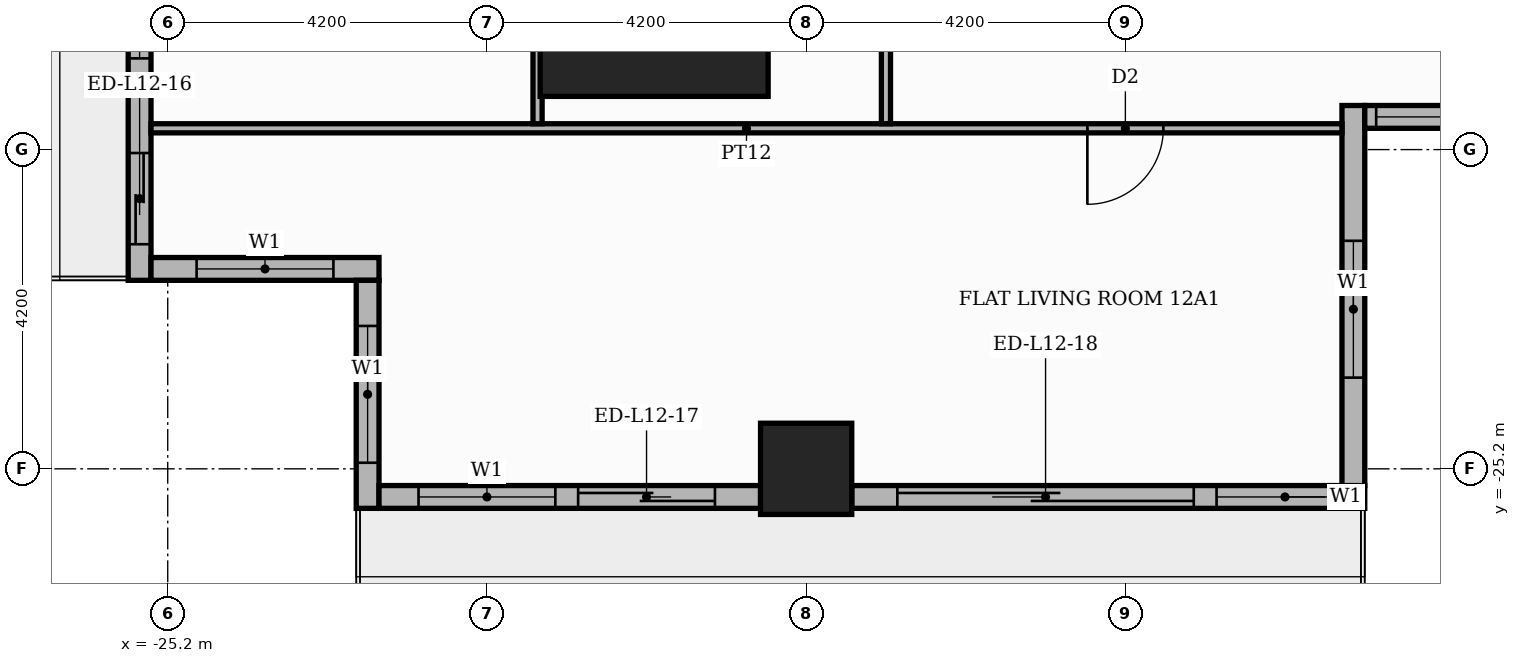
"""IFC4 building model, lengths in metres.
Left out: names, types, materials, properties, quantities, classifications, styles, units other than length and angle.
Written with IfcOpenShell. Run it as: python <this file> out.ifc"""

import sys

from ifc_helpers import new_model, si_unit, direction, frame, frame_2d, origin, origin_2d, place, context, subcontext, project, spatial, rectangle, extrude, element, fill, save


model = new_model("IFC4")
c1 = context("Model", 3, precision=1e-05, world=origin(), true_north=direction((0.0, 1.0)))
c2 = subcontext(c1, "Body", "Model", "MODEL_VIEW")
j1 = project(units=[si_unit("LENGTHUNIT", "METRE"), si_unit("PLANEANGLEUNIT", "RADIAN")], contexts=[c1])
p1 = place(None, origin())
s1 = spatial("IfcSite", under=j1, at=p1, CompositionType="ELEMENT")
p2 = place(p1, origin())
s2 = spatial("IfcBuilding", under=s1, at=p2, CompositionType="ELEMENT")
p3 = place(p2, frame((0.0, 0.0, 54.3)))
s3 = spatial("IfcBuildingStorey", under=s2, at=p3, CompositionType="ELEMENT", Elevation=54.3)
p4 = place(p3, frame((-18.8, -18.8, 0.0), z_axis=(0.0, 0.0, 1.0), x_axis=(1.0, 0.0, 0.0)))
e1 = element("IfcColumn", 1, at=p4, inside=s3, PredefinedType="COLUMN", context=c2, shape_type="SweptSolid", body=[
    extrude(rectangle(XDim=3.0, YDim=3.0, at=origin_2d()), origin(), (0.0, 0.0, 1.0), 3.9),
])
p5 = place(p3, frame((-16.8, -25.2, 0.0), z_axis=(0.0, 0.0, 1.0), x_axis=(1.0, 0.0, 0.0)))
e2 = element("IfcColumn", 2, at=p5, inside=s3, PredefinedType="COLUMN", context=c2, shape_type="SweptSolid", body=[
    extrude(rectangle(XDim=1.2, YDim=1.2, at=origin_2d()), origin(), (0.0, 0.0, 1.0), 3.9),
])
p6 = place(p3, frame((-25.57, -17.4, 0.0), z_axis=(0.0, 0.0, 1.0), x_axis=(0.0, -1.0, 0.0)))
e3 = element("IfcWall", 3, at=p6, inside=s3, PredefinedType="STANDARD", context=c2, shape_type="SweptSolid", body=[
    extrude(rectangle(XDim=5.32, YDim=0.3, at=frame_2d((2.66, 0.0))), origin(), (0.0, 0.0, 1.0), 3.48),
])
p7 = place(p6, frame((0.6, 0.0, 0.9)))
e4 = element("IfcOpeningElement", 4, at=p7, cuts=e3, PredefinedType="OPENING", context=c2, shape_type="SweptSolid", body=[
    extrude(rectangle(XDim=1.8, YDim=2.1, at=frame_2d((0.9, 1.05))), frame((0.0, 0.16, 0.0), z_axis=(0.0, -1.0, 0.0), x_axis=(1.0, 0.0, 0.0)), (0.0, 0.0, 1.0), 0.32),
])
p8 = place(p6, frame((3.645, 0.0, 0.0)))
e5 = element("IfcOpeningElement", 5, at=p8, cuts=e3, PredefinedType="OPENING", context=c2, shape_type="SweptSolid", body=[
    extrude(rectangle(XDim=1.2, YDim=2.4, at=frame_2d((0.6, 1.2))), frame((0.0, 0.16, 0.0), z_axis=(0.0, -1.0, 0.0), x_axis=(1.0, 0.0, 0.0)), (0.0, 0.0, 1.0), 0.32),
])
p9 = place(p3, frame((-25.42, -22.57, 0.0), z_axis=(0.0, 0.0, 1.0), x_axis=(1.0, 0.0, 0.0)))
e6 = element("IfcWall", 6, at=p9, inside=s3, PredefinedType="STANDARD", context=c2, shape_type="SweptSolid", body=[
    extrude(rectangle(XDim=3.0, YDim=0.3, at=frame_2d((1.5, 0.0))), origin(), (0.0, 0.0, 1.0), 3.48),
])
p10 = place(p9, frame((0.6, 0.0, 0.9)))
e7 = element("IfcOpeningElement", 7, at=p10, cuts=e6, PredefinedType="OPENING", context=c2, shape_type="SweptSolid", body=[
    extrude(rectangle(XDim=1.8, YDim=2.1, at=frame_2d((0.9, 1.05))), frame((0.0, 0.16, 0.0), z_axis=(0.0, -1.0, 0.0), x_axis=(1.0, 0.0, 0.0)), (0.0, 0.0, 1.0), 0.32),
])
p11 = place(p3, frame((-22.57, -22.72, 0.0), z_axis=(0.0, 0.0, 1.0), x_axis=(0.0, -1.0, 0.0)))
e8 = element("IfcWall", 8, at=p11, inside=s3, PredefinedType="STANDARD", context=c2, shape_type="SweptSolid", body=[
    extrude(rectangle(XDim=3.0, YDim=0.3, at=frame_2d((1.5, 0.0))), origin(), (0.0, 0.0, 1.0), 3.48),
])
p12 = place(p11, frame((0.6, 0.0, 0.9)))
e9 = element("IfcOpeningElement", 9, at=p12, cuts=e8, PredefinedType="OPENING", context=c2, shape_type="SweptSolid", body=[
    extrude(rectangle(XDim=1.8, YDim=2.1, at=frame_2d((0.9, 1.05))), frame((0.0, 0.16, 0.0), z_axis=(0.0, -1.0, 0.0), x_axis=(1.0, 0.0, 0.0)), (0.0, 0.0, 1.0), 0.32),
])
p13 = place(p3, frame((-22.42, -25.57, 0.0), z_axis=(0.0, 0.0, 1.0), x_axis=(1.0, 0.0, 0.0)))
e10 = element("IfcWall", 10, at=p13, inside=s3, PredefinedType="STANDARD", context=c2, shape_type="SweptSolid", body=[
    extrude(rectangle(XDim=5.02, YDim=0.3, at=frame_2d((2.51, 0.0))), origin(), (0.0, 0.0, 1.0), 3.48),
])
p14 = place(p13, frame((0.52, 0.0, 0.9)))
e11 = element("IfcOpeningElement", 11, at=p14, cuts=e10, PredefinedType="OPENING", context=c2, shape_type="SweptSolid", body=[
    extrude(rectangle(XDim=1.8, YDim=2.1, at=frame_2d((0.9, 1.05))), frame((0.0, 0.16, 0.0), z_axis=(0.0, -1.0, 0.0), x_axis=(1.0, 0.0, 0.0)), (0.0, 0.0, 1.0), 0.32),
])
p15 = place(p13, frame((2.62, 0.0, 0.0)))
e12 = element("IfcOpeningElement", 12, at=p15, cuts=e10, PredefinedType="OPENING", context=c2, shape_type="SweptSolid", body=[
    extrude(rectangle(XDim=1.8, YDim=2.4, at=frame_2d((0.9, 1.2))), frame((0.0, 0.16, 0.0), z_axis=(0.0, -1.0, 0.0), x_axis=(1.0, 0.0, 0.0)), (0.0, 0.0, 1.0), 0.32),
])
p16 = place(p3, frame((-16.2, -25.57, 0.0), z_axis=(0.0, 0.0, 1.0), x_axis=(1.0, 0.0, 0.0)))
e13 = element("IfcWall", 13, at=p16, inside=s3, PredefinedType="STANDARD", context=c2, shape_type="SweptSolid", body=[
    extrude(rectangle(XDim=6.75, YDim=0.3, at=frame_2d((3.375, 0.0))), origin(), (0.0, 0.0, 1.0), 3.48),
])
p17 = place(p16, frame((0.6, 0.0, 0.0)))
e14 = element("IfcOpeningElement", 14, at=p17, cuts=e13, PredefinedType="OPENING", context=c2, shape_type="SweptSolid", body=[
    extrude(rectangle(XDim=3.9, YDim=2.4, at=frame_2d((1.95, 1.2))), frame((0.0, 0.16, 0.0), z_axis=(0.0, -1.0, 0.0), x_axis=(1.0, 0.0, 0.0)), (0.0, 0.0, 1.0), 0.32),
])
p18 = place(p16, frame((4.8, 0.0, 0.9)))
e15 = element("IfcOpeningElement", 15, at=p18, cuts=e13, PredefinedType="OPENING", context=c2, shape_type="SweptSolid", body=[
    extrude(rectangle(XDim=1.8, YDim=2.1, at=frame_2d((0.9, 1.05))), frame((0.0, 0.16, 0.0), z_axis=(0.0, -1.0, 0.0), x_axis=(1.0, 0.0, 0.0)), (0.0, 0.0, 1.0), 0.32),
])
p19 = place(p3, frame((-9.6, -25.42, 0.0), z_axis=(0.0, 0.0, 1.0), x_axis=(0.0, 1.0, 0.0)))
e16 = element("IfcWall", 16, at=p19, inside=s3, PredefinedType="STANDARD", context=c2, shape_type="SweptSolid", body=[
    extrude(rectangle(XDim=5.0, YDim=0.3, at=frame_2d((2.5, 0.0))), origin(), (0.0, 0.0, 1.0), 3.48),
])
p20 = place(p19, frame((1.42, 0.0, 0.9)))
e17 = element("IfcOpeningElement", 17, at=p20, cuts=e16, PredefinedType="OPENING", context=c2, shape_type="SweptSolid", body=[
    extrude(rectangle(XDim=1.8, YDim=2.1, at=frame_2d((0.9, 1.05))), frame((0.0, 0.16, 0.0), z_axis=(0.0, -1.0, 0.0), x_axis=(1.0, 0.0, 0.0)), (0.0, 0.0, 1.0), 0.32),
])
p21 = place(p3, frame((-9.45, -20.57, 0.0), z_axis=(0.0, 0.0, 1.0), x_axis=(1.0, 0.0, 0.0)))
e18 = element("IfcWall", 18, at=p21, inside=s3, PredefinedType="STANDARD", context=c2, shape_type="SweptSolid", body=[
    extrude(rectangle(XDim=19.2, YDim=0.3, at=frame_2d((9.6, 0.0))), origin(), (0.0, 0.0, 1.0), 3.48),
])
p22 = place(p21, frame((0.15, 0.0, 0.9)))
e19 = element("IfcOpeningElement", 19, at=p22, cuts=e18, PredefinedType="OPENING", context=c2, shape_type="SweptSolid", body=[
    extrude(rectangle(XDim=3.9, YDim=2.1, at=frame_2d((1.95, 1.05))), frame((0.0, 0.16, 0.0), z_axis=(0.0, -1.0, 0.0), x_axis=(1.0, 0.0, 0.0)), (0.0, 0.0, 1.0), 0.32),
])
p23 = place(p21, frame((4.35, 0.0, 0.9)))
e20 = element("IfcOpeningElement", 20, at=p23, cuts=e18, PredefinedType="OPENING", context=c2, shape_type="SweptSolid", body=[
    extrude(rectangle(XDim=6.0, YDim=2.1, at=frame_2d((3.0, 1.05))), frame((0.0, 0.16, 0.0), z_axis=(0.0, -1.0, 0.0), x_axis=(1.0, 0.0, 0.0)), (0.0, 0.0, 1.0), 0.32),
])
p24 = place(p21, frame((10.65, 0.0, 0.9)))
e21 = element("IfcOpeningElement", 21, at=p24, cuts=e18, PredefinedType="OPENING", context=c2, shape_type="SweptSolid", body=[
    extrude(rectangle(XDim=6.0, YDim=2.1, at=frame_2d((3.0, 1.05))), frame((0.0, 0.16, 0.0), z_axis=(0.0, -1.0, 0.0), x_axis=(1.0, 0.0, 0.0)), (0.0, 0.0, 1.0), 0.32),
])
p25 = place(p21, frame((16.95, 0.0, 0.9)))
e22 = element("IfcOpeningElement", 22, at=p25, cuts=e18, PredefinedType="OPENING", context=c2, shape_type="SweptSolid", body=[
    extrude(rectangle(XDim=1.8, YDim=2.1, at=frame_2d((0.9, 1.05))), frame((0.0, 0.16, 0.0), z_axis=(0.0, -1.0, 0.0), x_axis=(1.0, 0.0, 0.0)), (0.0, 0.0, 1.0), 0.32),
])
p26 = place(p3, frame((-25.42, -20.72, 0.0), z_axis=(0.0, 0.0, 1.0), x_axis=(1.0, 0.0, 0.0)))
e23 = element("IfcWall", 23, at=p26, inside=s3, PredefinedType="PARTITIONING", context=c2, shape_type="SweptSolid", body=[
    extrude(rectangle(XDim=15.67, YDim=0.12, at=frame_2d((7.835, 0.0))), origin(), (0.0, 0.0, 1.0), 3.48),
])
p27 = place(p26, frame((12.32, 0.0, 0.0)))
e24 = element("IfcOpeningElement", 24, at=p27, cuts=e23, PredefinedType="OPENING", context=c2, shape_type="SweptSolid", body=[
    extrude(rectangle(XDim=1.0, YDim=2.1, at=frame_2d((0.5, 1.05))), frame((0.0, 0.07, 0.0), z_axis=(0.0, -1.0, 0.0), x_axis=(1.0, 0.0, 0.0)), (0.0, 0.0, 1.0), 0.14),
])
p28 = place(p3, frame((-20.334, -20.66, 0.0), z_axis=(0.0, 0.0, 1.0), x_axis=(0.0, 1.0, 0.0)))
e25 = element("IfcWall", 25, at=p28, inside=s3, PredefinedType="PARTITIONING", context=c2, shape_type="SweptSolid", body=[
    extrude(rectangle(XDim=6.91, YDim=0.12, at=frame_2d((3.455, 0.0))), origin(), (0.0, 0.0, 1.0), 3.48),
])
p29 = place(p28, frame((4.792, 0.0, 0.0)))
e26 = element("IfcOpeningElement", 26, at=p29, cuts=e25, PredefinedType="OPENING", context=c2, shape_type="SweptSolid", body=[
    extrude(rectangle(XDim=0.9, YDim=2.1, at=frame_2d((0.45, 1.05))), frame((0.0, 0.07, 0.0), z_axis=(0.0, -1.0, 0.0), x_axis=(1.0, 0.0, 0.0)), (0.0, 0.0, 1.0), 0.14),
])
p30 = place(p3, frame((-15.75, -20.66, 0.0), z_axis=(0.0, 0.0, 1.0), x_axis=(0.0, 1.0, 0.0)))
e27 = element("IfcWall", 27, at=p30, inside=s3, PredefinedType="PARTITIONING", context=c2, shape_type="SweptSolid", body=[
    extrude(rectangle(XDim=6.91, YDim=0.12, at=frame_2d((3.455, 0.0))), origin(), (0.0, 0.0, 1.0), 3.48),
])
p31 = place(p30, frame((2.975, 0.0, 0.0)))
e28 = element("IfcOpeningElement", 28, at=p31, cuts=e27, PredefinedType="OPENING", context=c2, shape_type="SweptSolid", body=[
    extrude(rectangle(XDim=1.0, YDim=2.1, at=frame_2d((0.5, 1.05))), frame((0.0, 0.07, 0.0), z_axis=(0.0, -1.0, 0.0), x_axis=(1.0, 0.0, 0.0)), (0.0, 0.0, 1.0), 0.14),
])
p32 = place(p7, origin())
e29 = element("IfcWindow", 29, at=p32, inside=s3, PartitioningType="SINGLE_PANEL", PredefinedType="WINDOW", context=c2, shape_type="SweptSolid", body=[
    extrude(rectangle(XDim=1.8, YDim=2.1, at=frame_2d((0.9, 1.05))), frame((0.0, 0.03, 0.0), z_axis=(0.0, -1.0, 0.0), x_axis=(1.0, 0.0, 0.0)), (0.0, 0.0, 1.0), 0.06),
])
fill(e4, e29)
p33 = place(p8, origin())
e30 = element("IfcDoor", 30, at=p33, inside=s3, OperationType="SLIDING_TO_RIGHT", PredefinedType="DOOR", context=c2, shape_type="SweptSolid", body=[
    extrude(rectangle(XDim=1.2, YDim=2.4, at=frame_2d((0.6, 1.2))), frame((0.0, 0.025, 0.0), z_axis=(0.0, -1.0, 0.0), x_axis=(1.0, 0.0, 0.0)), (0.0, 0.0, 1.0), 0.05),
])
fill(e5, e30)
p34 = place(p10, origin())
e31 = element("IfcWindow", 31, at=p34, inside=s3, PartitioningType="SINGLE_PANEL", PredefinedType="WINDOW", context=c2, shape_type="SweptSolid", body=[
    extrude(rectangle(XDim=1.8, YDim=2.1, at=frame_2d((0.9, 1.05))), frame((0.0, 0.03, 0.0), z_axis=(0.0, -1.0, 0.0), x_axis=(1.0, 0.0, 0.0)), (0.0, 0.0, 1.0), 0.06),
])
fill(e7, e31)
p35 = place(p12, origin())
e32 = element("IfcWindow", 32, at=p35, inside=s3, PartitioningType="SINGLE_PANEL", PredefinedType="WINDOW", context=c2, shape_type="SweptSolid", body=[
    extrude(rectangle(XDim=1.8, YDim=2.1, at=frame_2d((0.9, 1.05))), frame((0.0, 0.03, 0.0), z_axis=(0.0, -1.0, 0.0), x_axis=(1.0, 0.0, 0.0)), (0.0, 0.0, 1.0), 0.06),
])
fill(e9, e32)
p36 = place(p14, origin())
e33 = element("IfcWindow", 33, at=p36, inside=s3, PartitioningType="SINGLE_PANEL", PredefinedType="WINDOW", context=c2, shape_type="SweptSolid", body=[
    extrude(rectangle(XDim=1.8, YDim=2.1, at=frame_2d((0.9, 1.05))), frame((0.0, 0.03, 0.0), z_axis=(0.0, -1.0, 0.0), x_axis=(1.0, 0.0, 0.0)), (0.0, 0.0, 1.0), 0.06),
])
fill(e11, e33)
p37 = place(p15, origin())
e34 = element("IfcDoor", 34, at=p37, inside=s3, OperationType="SLIDING_TO_RIGHT", PredefinedType="DOOR", context=c2, shape_type="SweptSolid", body=[
    extrude(rectangle(XDim=1.8, YDim=2.4, at=frame_2d((0.9, 1.2))), frame((0.0, 0.025, 0.0), z_axis=(0.0, -1.0, 0.0), x_axis=(1.0, 0.0, 0.0)), (0.0, 0.0, 1.0), 0.05),
])
fill(e12, e34)
p38 = place(p17, origin())
e35 = element("IfcDoor", 35, at=p38, inside=s3, OperationType="SLIDING_TO_LEFT", PredefinedType="DOOR", context=c2, shape_type="SweptSolid", body=[
    extrude(rectangle(XDim=3.9, YDim=2.4, at=frame_2d((1.95, 1.2))), frame((0.0, 0.025, 0.0), z_axis=(0.0, -1.0, 0.0), x_axis=(1.0, 0.0, 0.0)), (0.0, 0.0, 1.0), 0.05),
])
fill(e14, e35)
p39 = place(p18, origin())
e36 = element("IfcWindow", 36, at=p39, inside=s3, PartitioningType="SINGLE_PANEL", PredefinedType="WINDOW", context=c2, shape_type="SweptSolid", body=[
    extrude(rectangle(XDim=1.8, YDim=2.1, at=frame_2d((0.9, 1.05))), frame((0.0, 0.03, 0.0), z_axis=(0.0, -1.0, 0.0), x_axis=(1.0, 0.0, 0.0)), (0.0, 0.0, 1.0), 0.06),
])
fill(e15, e36)
p40 = place(p20, origin())
e37 = element("IfcWindow", 37, at=p40, inside=s3, PartitioningType="SINGLE_PANEL", PredefinedType="WINDOW", context=c2, shape_type="SweptSolid", body=[
    extrude(rectangle(XDim=1.8, YDim=2.1, at=frame_2d((0.9, 1.05))), frame((0.0, 0.03, 0.0), z_axis=(0.0, -1.0, 0.0), x_axis=(1.0, 0.0, 0.0)), (0.0, 0.0, 1.0), 0.06),
])
fill(e17, e37)
p41 = place(p22, origin())
e38 = element("IfcWindow", 38, at=p41, inside=s3, PartitioningType="SINGLE_PANEL", PredefinedType="WINDOW", context=c2, shape_type="SweptSolid", body=[
    extrude(rectangle(XDim=3.9, YDim=2.1, at=frame_2d((1.95, 1.05))), frame((0.0, 0.03, 0.0), z_axis=(0.0, -1.0, 0.0), x_axis=(1.0, 0.0, 0.0)), (0.0, 0.0, 1.0), 0.06),
])
fill(e19, e38)
p42 = place(p27, frame((1.0, 0.0, 0.0), z_axis=(0.0, 0.0, 1.0), x_axis=(-1.0, 0.0, 0.0)))
e39 = element("IfcDoor", 39, at=p42, inside=s3, OperationType="SINGLE_SWING_LEFT", PredefinedType="DOOR", context=c2, shape_type="SweptSolid", body=[
    extrude(rectangle(XDim=1.0, YDim=2.1, at=frame_2d((0.5, 1.05))), frame((0.0, 0.025, 0.0), z_axis=(0.0, -1.0, 0.0), x_axis=(1.0, 0.0, 0.0)), (0.0, 0.0, 1.0), 0.05),
])
fill(e24, e39)
save(model, sys.argv[1])
